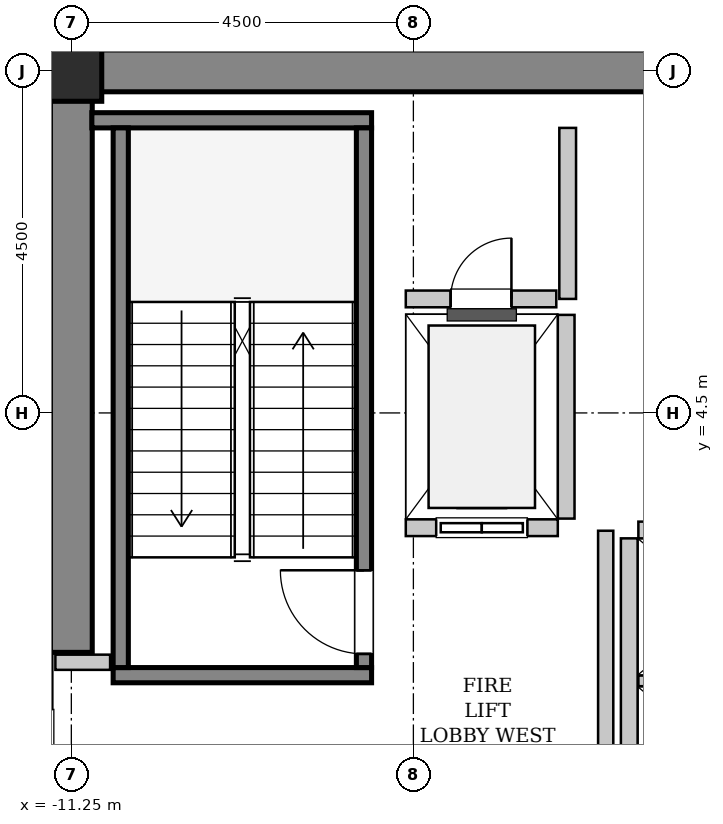
"""IFC4 building model, lengths in metres.
Left out: names, types, materials, properties, quantities, classifications, styles, units other than length and angle.
Written with IfcOpenShell. Run it as: python <this file> out.ifc"""

import sys

from ifc_helpers import new_model, si_unit, direction, frame, frame_2d, origin, origin_2d, place, context, subcontext, project, spatial, rectangle, hollow_rectangle, extrude, source, transform, mapped, element, fill, save


model = new_model("IFC4")
c1 = context("Model", 3, precision=1e-05, world=origin(), true_north=direction((0.0, 1.0)))
c2 = subcontext(c1, "Body", "Model", "MODEL_VIEW")
j1 = project(units=[si_unit("LENGTHUNIT", "METRE"), si_unit("PLANEANGLEUNIT", "RADIAN")], contexts=[c1])
p1 = place(None, origin())
s1 = spatial("IfcSite", under=j1, at=p1, CompositionType="ELEMENT")
p2 = place(p1, origin())
s2 = spatial("IfcBuilding", under=s1, at=p2, CompositionType="ELEMENT")
p3 = place(p2, frame((0.0, 0.0, 202.0)))
s3 = spatial("IfcBuildingStorey", under=s2, at=p3, CompositionType="ELEMENT", Elevation=202.0)
m1 = source(origin(), c2, "Body", "SweptSolid", [
    extrude(rectangle(XDim=9.975, YDim=0.55, at=frame_2d((4.987, 0.0))), origin(), (0.0, 0.0, 1.0), 4.6),
])
p4 = place(p3, frame((-11.525, 9.0, 0.0), z_axis=(0.0, 0.0, 1.0), x_axis=(1.0, 0.0, 0.0)))
e1 = element("IfcWall", 1, at=p4, inside=s3, PredefinedType="SHEAR", context=c2, shape_type="MappedRepresentation", body=[
    mapped(m1, transform((0.0, 0.0, 0.0), x_axis=(1.0, 0.0, 0.0), y_axis=(0.0, 1.0, 0.0), z_axis=(0.0, 0.0, 1.0), scale=1.0)),
])
m2 = source(origin(), c2, "Body", "SweptSolid", [
    extrude(rectangle(XDim=7.375, YDim=0.55, at=frame_2d((3.688, 0.0))), origin(), (0.0, 0.0, 1.0), 4.6),
])
p5 = place(p3, frame((-11.25, 1.35, 0.0), z_axis=(0.0, 0.0, 1.0), x_axis=(0.0, 1.0, 0.0)))
e2 = element("IfcWall", 2, at=p5, inside=s3, PredefinedType="SHEAR", context=c2, shape_type="MappedRepresentation", body=[
    mapped(m2, transform((0.0, 0.0, 0.0), x_axis=(1.0, 0.0, 0.0), y_axis=(0.0, 1.0, 0.0), z_axis=(0.0, 0.0, 1.0), scale=1.0)),
])
m3 = source(origin(), c2, "Body", "SweptSolid", [
    extrude(hollow_rectangle(XDim=0.8, YDim=0.8, WallThickness=0.04, InnerFilletRadius=0.04, OuterFilletRadius=0.08, at=origin_2d()), origin(), (0.0, 0.0, 1.0), 4.6),
])
p6 = place(p3, frame((-11.25, 9.0, 0.0), z_axis=(0.0, 0.0, 1.0), x_axis=(1.0, 0.0, 0.0)))
e3 = element("IfcColumn", 3, at=p6, inside=s3, PredefinedType="COLUMN", context=c2, shape_type="MappedRepresentation", body=[
    mapped(m3, transform((0.0, 0.0, 0.0), x_axis=(1.0, 0.0, 0.0), y_axis=(0.0, 1.0, 0.0), z_axis=(0.0, 0.0, 1.0), scale=1.0)),
])
m4 = source(origin(), c2, "Body", "SweptSolid", [
    extrude(rectangle(XDim=3.4, YDim=0.2, at=frame_2d((1.7, 0.0))), origin(), (0.0, 0.0, 1.0), 4.6),
])
p7 = place(p3, frame((-7.3, 1.05, 0.0), z_axis=(0.0, 0.0, 1.0), x_axis=(-1.0, 0.0, 0.0)))
e4 = element("IfcWall", 4, at=p7, inside=s3, PredefinedType="SOLIDWALL", context=c2, shape_type="MappedRepresentation", body=[
    mapped(m4, transform((0.0, 0.0, 0.0), x_axis=(1.0, 0.0, 0.0), y_axis=(0.0, 1.0, 0.0), z_axis=(0.0, 0.0, 1.0), scale=1.0)),
])
m5 = source(origin(), c2, "Body", "SweptSolid", [
    extrude(rectangle(XDim=3.68, YDim=0.2, at=frame_2d((1.84, 0.0))), origin(), (0.0, 0.0, 1.0), 4.6),
])
p8 = place(p3, frame((-7.3, 8.35, 0.0), z_axis=(0.0, 0.0, 1.0), x_axis=(-1.0, 0.0, 0.0)))
e5 = element("IfcWall", 5, at=p8, inside=s3, PredefinedType="SOLIDWALL", context=c2, shape_type="MappedRepresentation", body=[
    mapped(m5, transform((0.0, 0.0, 0.0), x_axis=(1.0, 0.0, 0.0), y_axis=(0.0, 1.0, 0.0), z_axis=(0.0, 0.0, 1.0), scale=1.0)),
])
m6 = source(origin(), c2, "Body", "SweptSolid", [
    extrude(rectangle(XDim=7.1, YDim=0.2, at=frame_2d((3.55, 0.0))), origin(), (0.0, 0.0, 1.0), 4.6),
])
p9 = place(p3, frame((-7.4, 1.15, 0.0), z_axis=(0.0, 0.0, 1.0), x_axis=(0.0, 1.0, 0.0)))
e6 = element("IfcWall", 6, at=p9, inside=s3, PredefinedType="SOLIDWALL", context=c2, shape_type="MappedRepresentation", body=[
    mapped(m6, transform((0.0, 0.0, 0.0), x_axis=(1.0, 0.0, 0.0), y_axis=(0.0, 1.0, 0.0), z_axis=(0.0, 0.0, 1.0), scale=1.0)),
])
p10 = place(p9, frame((0.18, 0.0, 0.0)))
e7 = element("IfcOpeningElement", 7, at=p10, cuts=e6, PredefinedType="OPENING", context=c2, shape_type="SweptSolid", body=[
    extrude(rectangle(XDim=1.1, YDim=2.15, at=frame_2d((0.55, 1.075))), frame((0.0, 0.11, 0.0), z_axis=(0.0, -1.0, 0.0), x_axis=(1.0, 0.0, 0.0)), (0.0, 0.0, 1.0), 0.22),
])
p11 = place(p3, frame((-10.6, 1.15, 0.0), z_axis=(0.0, 0.0, 1.0), x_axis=(0.0, 1.0, 0.0)))
e8 = element("IfcWall", 8, at=p11, inside=s3, PredefinedType="SOLIDWALL", context=c2, shape_type="MappedRepresentation", body=[
    mapped(m6, transform((0.0, 0.0, 0.0), x_axis=(1.0, 0.0, 0.0), y_axis=(0.0, 1.0, 0.0), z_axis=(0.0, 0.0, 1.0), scale=1.0)),
])
m7 = source(origin(), c2, "Body", "SweptSolid", [
    extrude(rectangle(XDim=2.0, YDim=0.22, at=frame_2d((1.0, 0.0))), origin(), (0.0, 0.0, 1.0), 4.335),
])
p12 = place(p3, frame((-6.85, 2.99, 0.0), z_axis=(0.0, 0.0, 1.0), x_axis=(1.0, 0.0, 0.0)))
e9 = element("IfcWall", 9, at=p12, inside=s3, PredefinedType="SOLIDWALL", context=c2, shape_type="MappedRepresentation", body=[
    mapped(m7, transform((0.0, 0.0, 0.0), x_axis=(1.0, 0.0, 0.0), y_axis=(0.0, 1.0, 0.0), z_axis=(0.0, 0.0, 1.0), scale=1.0)),
])
p13 = place(p12, frame((0.4, 0.0, 0.0)))
e10 = element("IfcOpeningElement", 10, at=p13, cuts=e9, PredefinedType="OPENING", context=c2, shape_type="SweptSolid", body=[
    extrude(rectangle(XDim=1.2, YDim=2.2, at=frame_2d((0.6, 1.1))), frame((0.0, 0.12, 0.0), z_axis=(0.0, -1.0, 0.0), x_axis=(1.0, 0.0, 0.0)), (0.0, 0.0, 1.0), 0.24),
])
m8 = source(origin(), c2, "Body", "SweptSolid", [
    extrude(rectangle(XDim=2.68, YDim=0.22, at=frame_2d((1.34, 0.0))), origin(), (0.0, 0.0, 1.0), 4.335),
])
p14 = place(p3, frame((-4.74, 3.11, 0.0), z_axis=(0.0, 0.0, 1.0), x_axis=(0.0, 1.0, 0.0)))
e11 = element("IfcWall", 11, at=p14, inside=s3, PredefinedType="SOLIDWALL", context=c2, shape_type="MappedRepresentation", body=[
    mapped(m8, transform((0.0, 0.0, 0.0), x_axis=(1.0, 0.0, 0.0), y_axis=(0.0, 1.0, 0.0), z_axis=(0.0, 0.0, 1.0), scale=1.0)),
])
m9 = source(origin(), c2, "Body", "SweptSolid", [
    extrude(rectangle(XDim=5.7, YDim=0.22, at=frame_2d((2.85, 0.0))), origin(), (0.0, 0.0, 1.0), 4.335),
])
p15 = place(p3, frame((-3.91, 2.85, 0.0), z_axis=(0.0, 0.0, 1.0), x_axis=(0.0, -1.0, 0.0)))
e12 = element("IfcWall", 12, at=p15, inside=s3, PredefinedType="SOLIDWALL", context=c2, shape_type="MappedRepresentation", body=[
    mapped(m9, transform((0.0, 0.0, 0.0), x_axis=(1.0, 0.0, 0.0), y_axis=(0.0, 1.0, 0.0), z_axis=(0.0, 0.0, 1.0), scale=1.0)),
])
m10 = source(origin(), c2, "Body", "SweptSolid", [
    extrude(rectangle(XDim=2.13, YDim=0.14, at=frame_2d((1.065, 0.0))), origin(), (0.0, 0.0, 1.0), 4.335),
])
p16 = place(p3, frame((-3.79, 0.975, 0.0), z_axis=(0.0, 0.0, 1.0), x_axis=(1.0, 0.0, 0.0)))
e13 = element("IfcWall", 13, at=p16, inside=s3, PredefinedType="PARTITIONING", context=c2, shape_type="MappedRepresentation", body=[
    mapped(m10, transform((0.0, 0.0, 0.0), x_axis=(1.0, 0.0, 0.0), y_axis=(0.0, 1.0, 0.0), z_axis=(0.0, 0.0, 1.0), scale=1.0)),
])
m11 = source(origin(), c2, "Body", "SweptSolid", [
    extrude(rectangle(XDim=2.13, YDim=0.22, at=frame_2d((1.065, 0.0))), origin(), (0.0, 0.0, 1.0), 4.335),
])
p17 = place(p3, frame((-1.66, 2.96, 0.0), z_axis=(0.0, 0.0, 1.0), x_axis=(-1.0, 0.0, 0.0)))
e14 = element("IfcWall", 14, at=p17, inside=s3, PredefinedType="SOLIDWALL", context=c2, shape_type="MappedRepresentation", body=[
    mapped(m11, transform((0.0, 0.0, 0.0), x_axis=(1.0, 0.0, 0.0), y_axis=(0.0, 1.0, 0.0), z_axis=(0.0, 0.0, 1.0), scale=1.0)),
])
m12 = source(origin(), c2, "Body", "SweptSolid", [
    extrude(rectangle(XDim=2.25, YDim=0.22, at=frame_2d((1.125, 0.0))), origin(), (0.0, 0.0, 1.0), 4.335),
])
p18 = place(p3, frame((-4.72, 6.0, 0.0), z_axis=(0.0, 0.0, 1.0), x_axis=(0.0, 1.0, 0.0)))
e15 = element("IfcWall", 15, at=p18, inside=s3, PredefinedType="SOLIDWALL", context=c2, shape_type="MappedRepresentation", body=[
    mapped(m12, transform((0.0, 0.0, 0.0), x_axis=(1.0, 0.0, 0.0), y_axis=(0.0, 1.0, 0.0), z_axis=(0.0, 0.0, 1.0), scale=1.0)),
])
m13 = source(origin(), c2, "Body", "SweptSolid", [
    extrude(rectangle(XDim=1.98, YDim=0.22, at=frame_2d((0.99, 0.0))), origin(), (0.0, 0.0, 1.0), 4.335),
])
p19 = place(p3, frame((-6.85, 6.0, 0.0), z_axis=(0.0, 0.0, 1.0), x_axis=(1.0, 0.0, 0.0)))
e16 = element("IfcWall", 16, at=p19, inside=s3, PredefinedType="SOLIDWALL", context=c2, shape_type="MappedRepresentation", body=[
    mapped(m13, transform((0.0, 0.0, 0.0), x_axis=(1.0, 0.0, 0.0), y_axis=(0.0, 1.0, 0.0), z_axis=(0.0, 0.0, 1.0), scale=1.0)),
])
p20 = place(p19, frame((0.59, 0.0, 0.0)))
e17 = element("IfcOpeningElement", 17, at=p20, cuts=e16, PredefinedType="OPENING", context=c2, shape_type="SweptSolid", body=[
    extrude(rectangle(XDim=0.8, YDim=2.0, at=frame_2d((0.4, 1.0))), frame((0.0, 0.12, 0.0), z_axis=(0.0, -1.0, 0.0), x_axis=(1.0, 0.0, 0.0)), (0.0, 0.0, 1.0), 0.24),
])
m14 = source(origin(), c2, "Body", "SweptSolid", [
    extrude(rectangle(XDim=5.9, YDim=0.2, at=frame_2d((2.95, 0.0))), origin(), (0.0, 0.0, 1.0), 4.335),
])
p21 = place(p3, frame((-4.22, -2.95, 0.0), z_axis=(0.0, 0.0, 1.0), x_axis=(0.0, 1.0, 0.0)))
e18 = element("IfcWall", 18, at=p21, inside=s3, PredefinedType="PARTITIONING", context=c2, shape_type="MappedRepresentation", body=[
    mapped(m14, transform((0.0, 0.0, 0.0), x_axis=(1.0, 0.0, 0.0), y_axis=(0.0, 1.0, 0.0), z_axis=(0.0, 0.0, 1.0), scale=1.0)),
])
m15 = source(origin(), c2, "Body", "SweptSolid", [
    extrude(rectangle(XDim=0.72, YDim=0.2, at=frame_2d((0.36, 0.0))), origin(), (0.0, 0.0, 1.0), 4.335),
])
p22 = place(p3, frame((-11.46, 1.22, 0.0), z_axis=(0.0, 0.0, 1.0), x_axis=(1.0, 0.0, 0.0)))
e19 = element("IfcWall", 19, at=p22, inside=s3, PredefinedType="PARTITIONING", context=c2, shape_type="MappedRepresentation", body=[
    mapped(m15, transform((0.0, 0.0, 0.0), x_axis=(1.0, 0.0, 0.0), y_axis=(0.0, 1.0, 0.0), z_axis=(0.0, 0.0, 1.0), scale=1.0)),
])
m16 = source(origin(), c2, "Body", "SweptSolid", [
    extrude(rectangle(XDim=1.1, YDim=2.15, at=frame_2d((0.55, 1.075))), frame((0.0, 0.025, 0.0), z_axis=(0.0, -1.0, 0.0), x_axis=(1.0, 0.0, 0.0)), (0.0, 0.0, 1.0), 0.05),
])
p23 = place(p10, origin())
e20 = element("IfcDoor", 20, at=p23, inside=s3, OperationType="SINGLE_SWING_RIGHT", PredefinedType="DOOR", context=c2, shape_type="MappedRepresentation", body=[
    mapped(m16, transform((0.0, 0.0, 0.0), x_axis=(1.0, 0.0, 0.0), y_axis=(0.0, 1.0, 0.0), z_axis=(0.0, 0.0, 1.0), scale=1.0)),
])
fill(e7, e20)
m17 = source(origin(), c2, "Body", "SweptSolid", [
    extrude(rectangle(XDim=1.2, YDim=2.2, at=frame_2d((0.6, 1.1))), frame((0.0, 0.025, 0.0), z_axis=(0.0, -1.0, 0.0), x_axis=(1.0, 0.0, 0.0)), (0.0, 0.0, 1.0), 0.05),
])
p24 = place(p13, origin())
e21 = element("IfcDoor", 21, at=p24, inside=s3, OperationType="SLIDING_TO_LEFT", PredefinedType="DOOR", context=c2, shape_type="MappedRepresentation", body=[
    mapped(m17, transform((0.0, 0.0, 0.0), x_axis=(1.0, 0.0, 0.0), y_axis=(0.0, 1.0, 0.0), z_axis=(0.0, 0.0, 1.0), scale=1.0)),
])
fill(e10, e21)
m18 = source(origin(), c2, "Body", "SweptSolid", [
    extrude(rectangle(XDim=0.8, YDim=2.0, at=frame_2d((0.4, 1.0))), frame((0.0, 0.025, 0.0), z_axis=(0.0, -1.0, 0.0), x_axis=(1.0, 0.0, 0.0)), (0.0, 0.0, 1.0), 0.05),
])
p25 = place(p20, origin())
e22 = element("IfcDoor", 22, at=p25, inside=s3, OperationType="SINGLE_SWING_RIGHT", PredefinedType="TRAPDOOR", context=c2, shape_type="MappedRepresentation", body=[
    mapped(m18, transform((0.0, 0.0, 0.0), x_axis=(1.0, 0.0, 0.0), y_axis=(0.0, 1.0, 0.0), z_axis=(0.0, 0.0, 1.0), scale=1.0)),
])
fill(e17, e22)
save(model, sys.argv[1])
